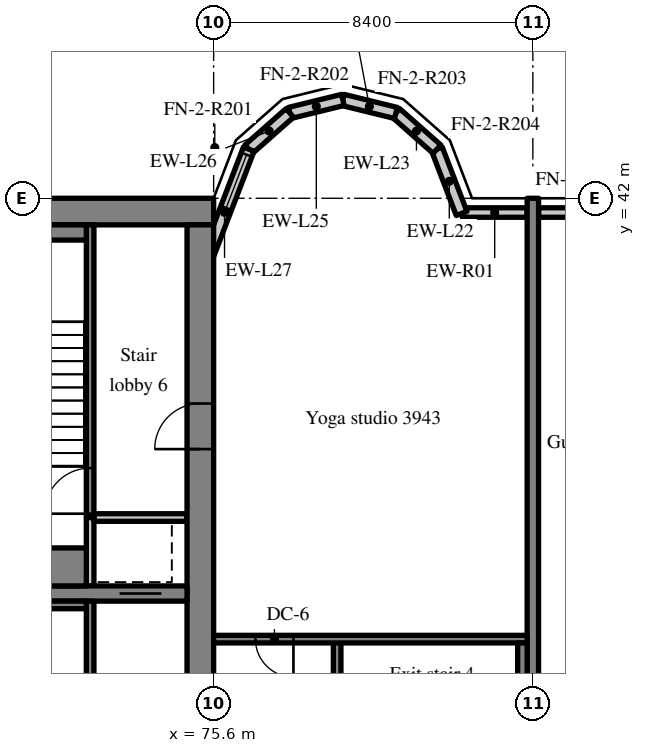
"""IFC4 building model, lengths in metres.
Left out: names, types, materials, properties, quantities, classifications, styles, units other than length and angle.
Written with IfcOpenShell. Run it as: python <this file> out.ifc"""

import sys

from ifc_helpers import new_model, si_unit, direction, frame, frame_2d, origin, place, context, subcontext, project, spatial, rectangle, extrude, source, transform, mapped, element, fill, save


model = new_model("IFC4")
c1 = context("Model", 3, precision=1e-05, world=origin(), true_north=direction((0.0, 1.0)))
c2 = subcontext(c1, "Body", "Model", "MODEL_VIEW")
j1 = project(units=[si_unit("LENGTHUNIT", "METRE"), si_unit("PLANEANGLEUNIT", "RADIAN")], contexts=[c1])
p1 = place(None, origin())
s1 = spatial("IfcSite", under=j1, at=p1, CompositionType="ELEMENT")
p2 = place(p1, origin())
s2 = spatial("IfcBuilding", under=s1, at=p2, CompositionType="ELEMENT")
p3 = place(p2, frame((0.0, 0.0, 163.0)))
s3 = spatial("IfcBuildingStorey", under=s2, at=p3, CompositionType="ELEMENT", Elevation=163.0)
m1 = source(origin(), c2, "Body", "SweptSolid", [
    extrude(rectangle(XDim=50.4, YDim=0.7, at=frame_2d((25.2, 0.0))), origin(), (0.0, 0.0, 1.0), 3.52),
])
p4 = place(p3, frame((25.2, 41.65, 0.0), z_axis=(0.0, 0.0, 1.0), x_axis=(1.0, 0.0, 0.0)))
e1 = element("IfcWall", 1, at=p4, inside=s3, PredefinedType="SHEAR", context=c2, shape_type="MappedRepresentation", body=[
    mapped(m1, transform((0.0, 0.0, 0.0), scale=1.0)),
])
m2 = source(origin(), c2, "Body", "SweptSolid", [
    extrude(rectangle(XDim=18.6, YDim=0.7, at=frame_2d((9.3, 0.0))), origin(), (0.0, 0.0, 1.0), 3.52),
])
p5 = place(p3, frame((75.25, 22.7, 0.0), z_axis=(0.0, 0.0, 1.0), x_axis=(0.0, 1.0, 0.0)))
e2 = element("IfcWall", 2, at=p5, inside=s3, PredefinedType="SHEAR", context=c2, shape_type="MappedRepresentation", body=[
    mapped(m2, transform((0.0, 0.0, 0.0), scale=1.0)),
])
m3 = source(origin(), c2, "Body", "SweptSolid", [
    extrude(rectangle(XDim=1.2, YDim=2.1, at=frame_2d((0.6, 1.05))), frame((0.0, 0.36, 0.0), z_axis=(0.0, -1.0, 0.0), x_axis=(1.0, 0.0, 0.0)), (0.0, 0.0, 1.0), 0.72),
])
p6 = place(p5, frame((12.7, 0.0, 0.0)))
e3 = element("IfcOpeningElement", 3, at=p6, cuts=e2, PredefinedType="OPENING", context=c2, shape_type="MappedRepresentation", body=[
    mapped(m3, transform((0.0, 0.0, 0.0), scale=1.0)),
])
m4 = source(origin(), c2, "Body", "SweptSolid", [
    extrude(rectangle(XDim=7.5, YDim=0.4, at=frame_2d((3.75, 0.0))), origin(), (0.0, 0.0, 1.0), 3.52),
])
p7 = place(p3, frame((67.4, 31.6, 0.0), z_axis=(0.0, 0.0, 1.0), x_axis=(1.0, 0.0, 0.0)))
e4 = element("IfcWall", 4, at=p7, inside=s3, PredefinedType="SHEAR", context=c2, shape_type="MappedRepresentation", body=[
    mapped(m4, transform((0.0, 0.0, 0.0), scale=1.0)),
])
m5 = source(origin(), c2, "Body", "SweptSolid", [
    extrude(rectangle(XDim=1.1, YDim=2.1, at=frame_2d((0.55, 1.05))), frame((0.0, 0.21, 0.0), z_axis=(0.0, -1.0, 0.0), x_axis=(1.0, 0.0, 0.0)), (0.0, 0.0, 1.0), 0.42),
])
p8 = place(p7, frame((5.725, 0.0, 0.0)))
e5 = element("IfcOpeningElement", 5, at=p8, cuts=e4, PredefinedType="OPENING", context=c2, shape_type="MappedRepresentation", body=[
    mapped(m5, transform((0.0, 0.0, 0.0), scale=1.0)),
])
m6 = source(origin(), c2, "Body", "SweptSolid", [
    extrude(rectangle(XDim=20.0, YDim=0.3, at=frame_2d((10.0, 0.0))), origin(), (0.0, 0.0, 1.0), 3.52),
])
p9 = place(p3, frame((84.0, 22.0, 0.0), z_axis=(0.0, 0.0, 1.0), x_axis=(0.0, 1.0, 0.0)))
e6 = element("IfcWall", 6, at=p9, inside=s3, PredefinedType="SHEAR", context=c2, shape_type="MappedRepresentation", body=[
    mapped(m6, transform((0.0, 0.0, 0.0), scale=1.0)),
])
m7 = source(origin(), c2, "Body", "SweptSolid", [
    extrude(rectangle(XDim=1.708, YDim=0.25, at=frame_2d((0.854, 0.0))), origin(), (0.0, 0.0, 1.0), 2.87),
])
p10 = place(p3, frame((83.85, 41.625, 0.0), z_axis=(0.0, 0.0, 1.0), x_axis=(-1.0, 0.0, 0.0)))
e7 = element("IfcWall", 7, at=p10, inside=s3, PredefinedType="SOLIDWALL", context=c2, shape_type="MappedRepresentation", body=[
    mapped(m7, transform((0.0, 0.0, 0.0), scale=1.0)),
])
m8 = source(origin(), c2, "Body", "SweptSolid", [
    extrude(rectangle(XDim=4.095, YDim=0.25, at=frame_2d((2.047, 0.0))), origin(), (0.0, 0.0, 1.0), 2.87),
])
p11 = place(p3, frame((88.245, 41.625, 0.0), z_axis=(0.0, 0.0, 1.0), x_axis=(-1.0, 0.0, 0.0)))
e8 = element("IfcWall", 8, at=p11, inside=s3, PredefinedType="SOLIDWALL", context=c2, shape_type="MappedRepresentation", body=[
    mapped(m8, transform((0.0, 0.0, 0.0), scale=1.0)),
])
m9 = source(origin(), c2, "Body", "SweptSolid", [
    extrude(rectangle(XDim=1.5, YDim=1.5, at=frame_2d((0.75, 0.75))), frame((0.0, 0.135, 0.0), z_axis=(0.0, -1.0, 0.0), x_axis=(1.0, 0.0, 0.0)), (0.0, 0.0, 1.0), 0.27),
])
p12 = place(p11, frame((1.297, 0.0, 0.9)))
e9 = element("IfcOpeningElement", 9, at=p12, cuts=e8, PredefinedType="OPENING", context=c2, shape_type="MappedRepresentation", body=[
    mapped(m9, transform((0.0, 0.0, 0.0), scale=1.0)),
])
m10 = source(origin(), c2, "Body", "SweptSolid", [
    extrude(rectangle(XDim=1.812, YDim=0.3, at=frame_2d((0.906, 0.0))), origin(), (0.0, 0.0, 1.0), 3.52),
])
p13 = place(p3, frame((82.125, 41.6, 0.0), z_axis=(0.0, 0.0, 1.0), x_axis=(-0.357877270961, 0.93376863244, 0.0)))
e10 = element("IfcWall", 10, at=p13, inside=s3, PredefinedType="SOLIDWALL", context=c2, shape_type="MappedRepresentation", body=[
    mapped(m10, transform((0.0, 0.0, 0.0), scale=1.0)),
])
m11 = source(origin(), c2, "Body", "SweptSolid", [
    extrude(rectangle(XDim=1.44, YDim=0.3, at=frame_2d((0.72, 0.0))), origin(), (0.0, 0.0, 1.0), 3.52),
])
p14 = place(p3, frame((81.477, 43.292, 0.0), z_axis=(0.0, 0.0, 1.0), x_axis=(-0.74957555648, 0.661918790432, 0.0)))
e11 = element("IfcWall", 11, at=p14, inside=s3, PredefinedType="SOLIDWALL", context=c2, shape_type="MappedRepresentation", body=[
    mapped(m11, transform((0.0, 0.0, 0.0), scale=1.0)),
])
m12 = source(origin(), c2, "Body", "SweptSolid", [
    extrude(rectangle(XDim=1.439, YDim=0.3, at=frame_2d((0.719, 0.0))), origin(), (0.0, 0.0, 1.0), 3.52),
])
for number, where, z_axis, x_axis in (
    (12, (80.397, 44.245, 0.0), (0.0, 0.0, 1.0), (-0.971, 0.238, 0.0)),
    (13, (79.0, 44.588, 0.0), (0.0, 0.0, 1.0), (-0.971, -0.238, 0.0)),
):
    element("IfcWall", number, at=place(p3, frame(where, z_axis=z_axis, x_axis=x_axis)), inside=s3, PredefinedType="SOLIDWALL", context=c2, shape_type="MappedRepresentation", body=[
        mapped(m12, transform((0.0, 0.0, 0.0), scale=1.0)),
    ])
p15 = place(p3, frame((77.603, 44.245, 0.0), z_axis=(0.0, 0.0, 1.0), x_axis=(-0.74957555648, -0.661918790432, 0.0)))
e14 = element("IfcWall", 14, at=p15, inside=s3, PredefinedType="SOLIDWALL", context=c2, shape_type="MappedRepresentation", body=[
    mapped(m11, transform((0.0, 0.0, 0.0), scale=1.0)),
])
m13 = source(origin(), c2, "Body", "SweptSolid", [
    extrude(rectangle(XDim=3.559, YDim=0.3, at=frame_2d((1.78, 0.0))), origin(), (0.0, 0.0, 1.0), 3.52),
])
p16 = place(p3, frame((76.523, 43.292, 0.0), z_axis=(0.0, 0.0, 1.0), x_axis=(-0.35779745313, -0.933799219604, 0.0)))
e15 = element("IfcWall", 15, at=p16, inside=s3, PredefinedType="SOLIDWALL", context=c2, shape_type="MappedRepresentation", body=[
    mapped(m13, transform((0.0, 0.0, 0.0), scale=1.0)),
])
m14 = source(origin(), c2, "Body", "SweptSolid", [
    extrude(rectangle(XDim=1.5, YDim=2.0, at=frame_2d((0.75, 1.0))), frame((0.0, 0.16, 0.0), z_axis=(0.0, -1.0, 0.0), x_axis=(1.0, 0.0, 0.0)), (0.0, 0.0, 1.0), 0.32),
])
p17 = place(p16, frame((0.156, 0.0, 0.9)))
e16 = element("IfcOpeningElement", 16, at=p17, cuts=e15, PredefinedType="OPENING", context=c2, shape_type="MappedRepresentation", body=[
    mapped(m14, transform((0.0, 0.0, 0.0), scale=1.0)),
])
m15 = source(origin(), c2, "Body", "SweptSolid", [
    extrude(rectangle(XDim=8.7, YDim=0.2, at=frame_2d((4.35, 0.0))), origin(), (0.0, 0.0, 1.0), 3.52),
])
p18 = place(p3, frame((72.35, 22.7, 0.0), z_axis=(0.0, 0.0, 1.0), x_axis=(0.0, 1.0, 0.0)))
e17 = element("IfcWall", 17, at=p18, inside=s3, PredefinedType="SOLIDWALL", context=c2, shape_type="MappedRepresentation", body=[
    mapped(m15, transform((0.0, 0.0, 0.0), scale=1.0)),
])
m16 = source(origin(), c2, "Body", "SweptSolid", [
    extrude(rectangle(XDim=1.2, YDim=2.1, at=frame_2d((0.6, 1.05))), frame((0.0, 0.11, 0.0), z_axis=(0.0, -1.0, 0.0), x_axis=(1.0, 0.0, 0.0)), (0.0, 0.0, 1.0), 0.22),
])
p19 = place(p18, frame((0.9, 0.0, 0.0)))
e18 = element("IfcOpeningElement", 18, at=p19, cuts=e17, PredefinedType="OPENING", context=c2, shape_type="MappedRepresentation", body=[
    mapped(m16, transform((0.0, 0.0, 0.0), scale=1.0)),
])
m17 = source(origin(), c2, "Body", "SweptSolid", [
    extrude(rectangle(XDim=1.8, YDim=0.2, at=frame_2d((0.9, 0.0))), origin(), (0.0, 0.0, 1.0), 3.52),
])
p20 = place(p3, frame((72.35, 31.8, 0.0), z_axis=(0.0, 0.0, 1.0), x_axis=(0.0, 1.0, 0.0)))
e19 = element("IfcWall", 19, at=p20, inside=s3, PredefinedType="SOLIDWALL", context=c2, shape_type="MappedRepresentation", body=[
    mapped(m17, transform((0.0, 0.0, 0.0), scale=1.0)),
])
m18 = source(origin(), c2, "Body", "SweptSolid", [
    extrude(rectangle(XDim=2.45, YDim=0.2, at=frame_2d((1.225, 0.0))), origin(), (0.0, 0.0, 1.0), 3.52),
])
p21 = place(p3, frame((72.45, 33.6, 0.0), z_axis=(0.0, 0.0, 1.0), x_axis=(1.0, 0.0, 0.0)))
e20 = element("IfcWall", 20, at=p21, inside=s3, PredefinedType="SOLIDWALL", context=c2, shape_type="MappedRepresentation", body=[
    mapped(m18, transform((0.0, 0.0, 0.0), scale=1.0)),
])
m19 = source(origin(), c2, "Body", "SweptSolid", [
    extrude(rectangle(XDim=7.7, YDim=0.2, at=frame_2d((3.85, 0.0))), origin(), (0.0, 0.0, 1.0), 3.52),
])
p22 = place(p3, frame((72.35, 33.6, 0.0), z_axis=(0.0, 0.0, 1.0), x_axis=(0.0, 1.0, 0.0)))
e21 = element("IfcWall", 21, at=p22, inside=s3, PredefinedType="SOLIDWALL", context=c2, shape_type="MappedRepresentation", body=[
    mapped(m19, transform((0.0, 0.0, 0.0), scale=1.0)),
])
p23 = place(p22, frame((0.1, 0.0, 0.0)))
e22 = element("IfcOpeningElement", 22, at=p23, cuts=e21, PredefinedType="OPENING", context=c2, shape_type="MappedRepresentation", body=[
    mapped(m16, transform((0.0, 0.0, 0.0), scale=1.0)),
])
m20 = source(origin(), c2, "Body", "SweptSolid", [
    extrude(rectangle(XDim=8.3, YDim=0.2, at=frame_2d((4.15, 0.0))), origin(), (0.0, 0.0, 1.0), 3.52),
])
p24 = place(p3, frame((78.85, 22.1, 0.0), z_axis=(0.0, 0.0, 1.0), x_axis=(0.0, 1.0, 0.0)))
e23 = element("IfcWall", 23, at=p24, inside=s3, PredefinedType="SOLIDWALL", context=c2, shape_type="MappedRepresentation", body=[
    mapped(m20, transform((0.0, 0.0, 0.0), scale=1.0)),
])
p25 = place(p24, frame((0.6, 0.0, 0.0)))
e24 = element("IfcOpeningElement", 24, at=p25, cuts=e23, PredefinedType="OPENING", context=c2, shape_type="MappedRepresentation", body=[
    mapped(m16, transform((0.0, 0.0, 0.0), scale=1.0)),
])
m21 = source(origin(), c2, "Body", "SweptSolid", [
    extrude(rectangle(XDim=8.25, YDim=0.2, at=frame_2d((4.125, 0.0))), origin(), (0.0, 0.0, 1.0), 3.52),
])
p26 = place(p3, frame((83.85, 30.4, 0.0), z_axis=(0.0, 0.0, 1.0), x_axis=(-1.0, 0.0, 0.0)))
e25 = element("IfcWall", 25, at=p26, inside=s3, PredefinedType="SOLIDWALL", context=c2, shape_type="MappedRepresentation", body=[
    mapped(m21, transform((0.0, 0.0, 0.0), scale=1.0)),
])
m22 = source(origin(), c2, "Body", "SweptSolid", [
    extrude(rectangle(XDim=1.0, YDim=2.1, at=frame_2d((0.5, 1.05))), frame((0.0, 0.11, 0.0), z_axis=(0.0, -1.0, 0.0), x_axis=(1.0, 0.0, 0.0)), (0.0, 0.0, 1.0), 0.22),
])
p27 = place(p26, frame((6.15, 0.0, 0.0)))
e26 = element("IfcOpeningElement", 26, at=p27, cuts=e25, PredefinedType="OPENING", context=c2, shape_type="MappedRepresentation", body=[
    mapped(m22, transform((0.0, 0.0, 0.0), scale=1.0)),
])
m23 = source(origin(), c2, "Body", "SweptSolid", [
    extrude(rectangle(XDim=4.85, YDim=0.2, at=frame_2d((2.425, 0.0))), origin(), (0.0, 0.0, 1.0), 3.52),
])
p28 = place(p3, frame((67.4, 31.3, 0.0), z_axis=(0.0, 0.0, 1.0), x_axis=(1.0, 0.0, 0.0)))
e27 = element("IfcWall", 27, at=p28, inside=s3, PredefinedType="SOLIDWALL", context=c2, shape_type="MappedRepresentation", body=[
    mapped(m23, transform((0.0, 0.0, 0.0), scale=1.0)),
])
m24 = source(origin(), c2, "Body", "SweptSolid", [
    extrude(rectangle(XDim=4.85, YDim=0.4, at=frame_2d((2.425, 0.0))), origin(), (0.0, 0.0, 1.0), 3.52),
])
p29 = place(p3, frame((67.4, 41.1, 0.0), z_axis=(0.0, 0.0, 1.0), x_axis=(1.0, 0.0, 0.0)))
e28 = element("IfcWall", 28, at=p29, inside=s3, PredefinedType="SOLIDWALL", context=c2, shape_type="MappedRepresentation", body=[
    mapped(m24, transform((0.0, 0.0, 0.0), scale=1.0)),
])
m25 = source(origin(), c2, "Body", "SweptSolid", [
    extrude(rectangle(XDim=4.85, YDim=1.0, at=frame_2d((2.425, 0.0))), origin(), (0.0, 0.0, 1.0), 3.52),
])
p30 = place(p3, frame((67.4, 32.3, 0.0), z_axis=(0.0, 0.0, 1.0), x_axis=(1.0, 0.0, 0.0)))
e29 = element("IfcWall", 29, at=p30, inside=s3, PredefinedType="SOLIDWALL", context=c2, shape_type="MappedRepresentation", body=[
    mapped(m25, transform((0.0, 0.0, 0.0), scale=1.0)),
])
m26 = source(origin(), c2, "Body", "SweptSolid", [
    extrude(rectangle(XDim=8.1, YDim=0.25, at=frame_2d((4.05, 0.0))), origin(), (0.0, 0.0, 1.0), 3.52),
])
p31 = place(p3, frame((83.725, 22.2, 0.0), z_axis=(0.0, 0.0, 1.0), x_axis=(0.0, 1.0, 0.0)))
e30 = element("IfcWall", 30, at=p31, inside=s3, PredefinedType="SOLIDWALL", context=c2, shape_type="MappedRepresentation", body=[
    mapped(m26, transform((0.0, 0.0, 0.0), scale=1.0)),
])
m27 = source(origin(), c2, "Body", "SweptSolid", [
    extrude(rectangle(XDim=1.5, YDim=2.0, at=frame_2d((0.75, 1.0))), frame((0.0, 0.03, 0.0), z_axis=(0.0, -1.0, 0.0), x_axis=(1.0, 0.0, 0.0)), (0.0, 0.0, 1.0), 0.06),
])
p32 = place(p17, origin())
e31 = element("IfcWindow", 31, at=p32, inside=s3, PartitioningType="SINGLE_PANEL", PredefinedType="WINDOW", context=c2, shape_type="MappedRepresentation", body=[
    mapped(m27, transform((0.0, 0.0, 0.0), scale=1.0)),
])
fill(e16, e31)
m28 = source(origin(), c2, "Body", "SweptSolid", [
    extrude(rectangle(XDim=1.1, YDim=2.1, at=frame_2d((0.55, 1.05))), frame((0.0, 0.025, 0.0), z_axis=(0.0, -1.0, 0.0), x_axis=(1.0, 0.0, 0.0)), (0.0, 0.0, 1.0), 0.05),
])
p33 = place(p8, origin())
e32 = element("IfcDoor", 32, at=p33, inside=s3, OperationType="SLIDING_TO_LEFT", PredefinedType="DOOR", context=c2, shape_type="MappedRepresentation", body=[
    mapped(m28, transform((0.0, 0.0, 0.0), scale=1.0)),
])
fill(e5, e32)
m29 = source(origin(), c2, "Body", "SweptSolid", [
    extrude(rectangle(XDim=1.2, YDim=2.1, at=frame_2d((0.6, 1.05))), frame((0.0, 0.025, 0.0), z_axis=(0.0, -1.0, 0.0), x_axis=(1.0, 0.0, 0.0)), (0.0, 0.0, 1.0), 0.05),
])
p34 = place(p23, origin())
e33 = element("IfcDoor", 33, at=p34, inside=s3, OperationType="SINGLE_SWING_LEFT", PredefinedType="DOOR", context=c2, shape_type="MappedRepresentation", body=[
    mapped(m29, transform((0.0, 0.0, 0.0), scale=1.0)),
])
fill(e22, e33)
p35 = place(p6, origin())
e34 = element("IfcDoor", 34, at=p35, inside=s3, OperationType="SINGLE_SWING_LEFT", PredefinedType="DOOR", context=c2, shape_type="MappedRepresentation", body=[
    mapped(m29, transform((0.0, 0.0, 0.0), scale=1.0)),
])
fill(e3, e34)
m30 = source(origin(), c2, "Body", "SweptSolid", [
    extrude(rectangle(XDim=1.0, YDim=2.1, at=frame_2d((0.5, 1.05))), frame((0.0, 0.025, 0.0), z_axis=(0.0, -1.0, 0.0), x_axis=(1.0, 0.0, 0.0)), (0.0, 0.0, 1.0), 0.05),
])
p36 = place(p27, origin())
e35 = element("IfcDoor", 35, at=p36, inside=s3, OperationType="SINGLE_SWING_LEFT", PredefinedType="DOOR", context=c2, shape_type="MappedRepresentation", body=[
    mapped(m30, transform((0.0, 0.0, 0.0), scale=1.0)),
])
fill(e26, e35)
save(model, sys.argv[1])
